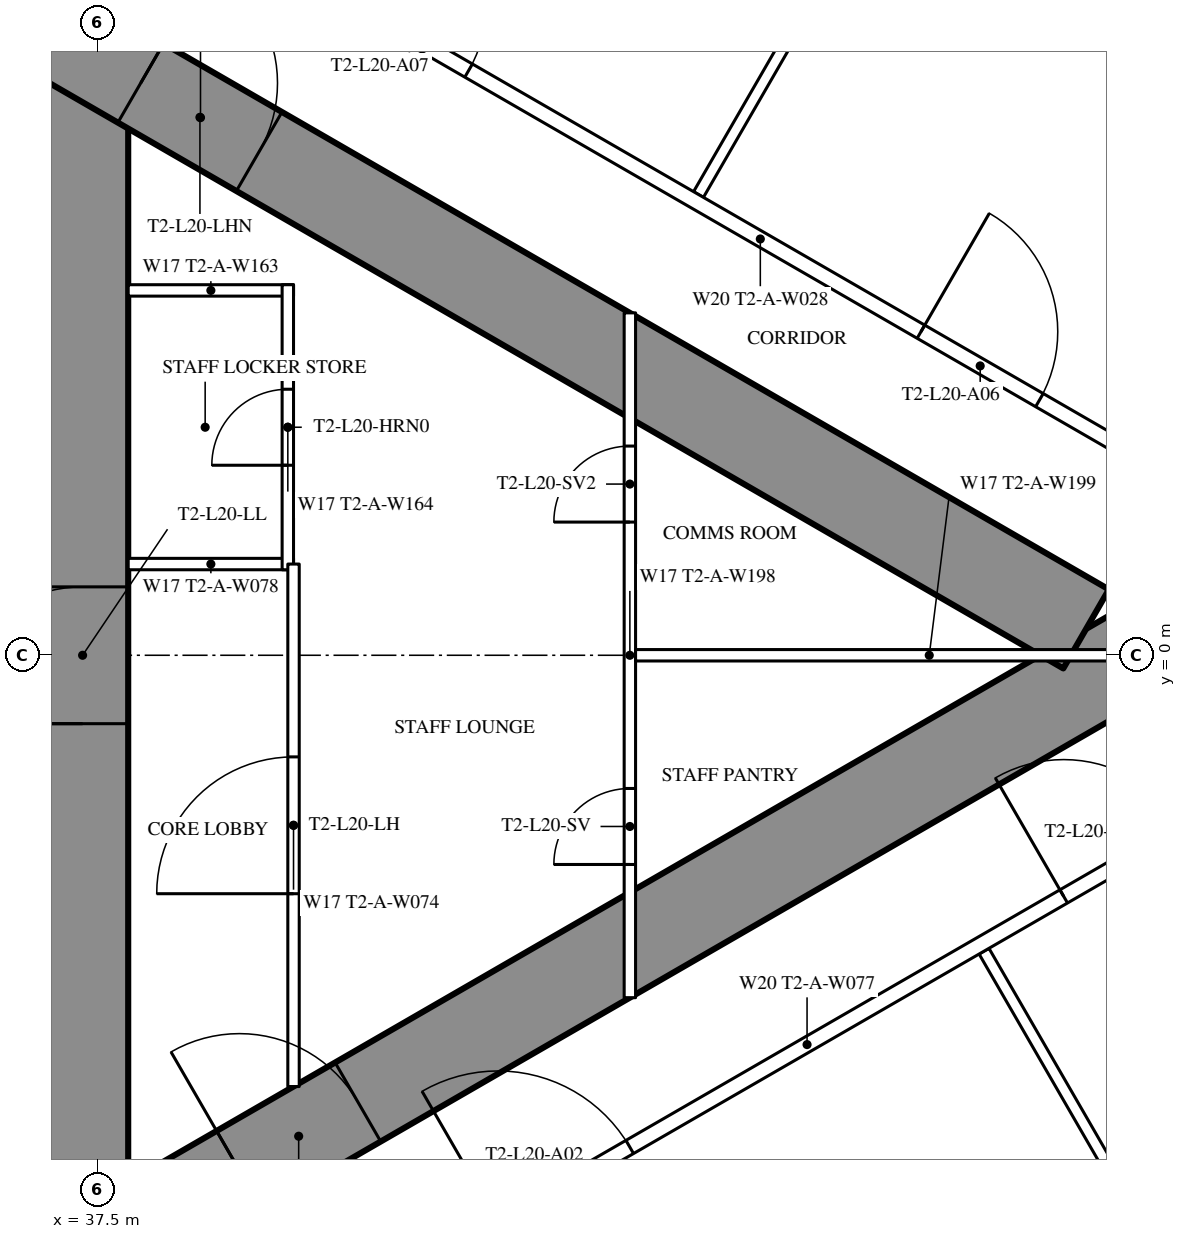
"""IFC4 building model, lengths in metres.
Left out: names, types, materials, properties, quantities, classifications, styles, units other than length and angle.
Written with IfcOpenShell. Run it as: python <this file> out.ifc"""

import sys

from ifc_helpers import new_model, si_unit, direction, frame, frame_2d, origin, place, context, subcontext, project, spatial, rectangle, extrude, element, fill, save


model = new_model("IFC4")
c1 = context("Model", 3, precision=1e-05, world=origin(), true_north=direction((0.0, 1.0)))
c2 = subcontext(c1, "Body", "Model", "MODEL_VIEW")
j1 = project(units=[si_unit("LENGTHUNIT", "METRE"), si_unit("PLANEANGLEUNIT", "RADIAN")], contexts=[c1])
p1 = place(None, origin())
s1 = spatial("IfcSite", under=j1, at=p1, CompositionType="ELEMENT")
p2 = place(p1, origin())
s2 = spatial("IfcBuilding", under=s1, at=p2, CompositionType="ELEMENT")
p3 = place(p2, frame((0.0, 0.0, 77.5)))
s3 = spatial("IfcBuildingStorey", under=s2, at=p3, CompositionType="ELEMENT", Elevation=77.5)
p4 = place(p3, frame((37.3, -8.6, 0.0), z_axis=(0.0, 0.0, 1.0), x_axis=(0.0, 1.0, 0.0)))
e1 = element("IfcWall", 1, at=p4, inside=s3, PredefinedType="SHEAR", context=c2, shape_type="SweptSolid", body=[
    extrude(rectangle(XDim=17.2, YDim=1.2, at=frame_2d((8.6, 0.0))), origin(), (0.0, 0.0, 1.0), 3.5),
])
p5 = place(p4, frame((7.7, 0.0, 0.0)))
e2 = element("IfcOpeningElement", 2, at=p5, cuts=e1, PredefinedType="OPENING", context=c2, shape_type="SweptSolid", body=[
    extrude(rectangle(XDim=1.8, YDim=2.2, at=frame_2d((0.9, 1.1))), frame((0.0, 0.61, 0.0), z_axis=(0.0, -1.0, 0.0), x_axis=(1.0, 0.0, 0.0)), (0.0, 0.0, 1.0), 1.22),
])
p6 = place(p3, frame((27.2, -13.8, 0.0), z_axis=(0.0, 0.0, 1.0), x_axis=(0.866027159892, 0.499996958321, 0.0)))
e3 = element("IfcWall", 3, at=p6, inside=s3, PredefinedType="SHEAR", context=c2, shape_type="SweptSolid", body=[
    extrude(rectangle(XDim=27.947, YDim=1.2, at=frame_2d((13.973, 0.0))), origin(), (0.0, 0.0, 1.0), 3.5),
])
p7 = place(p6, frame((5.65, 0.0, 0.0)))
e4 = element("IfcOpeningElement", 4, at=p7, cuts=e3, PredefinedType="OPENING", context=c2, shape_type="SweptSolid", body=[
    extrude(rectangle(XDim=1.0, YDim=2.2, at=frame_2d((0.5, 1.1))), frame((0.0, 0.61, 0.0), z_axis=(0.0, -1.0, 0.0), x_axis=(1.0, 0.0, 0.0)), (0.0, 0.0, 1.0), 1.22),
])
p8 = place(p6, frame((14.045, 0.0, 0.0)))
e5 = element("IfcOpeningElement", 5, at=p8, cuts=e3, PredefinedType="OPENING", context=c2, shape_type="SweptSolid", body=[
    extrude(rectangle(XDim=1.8, YDim=2.2, at=frame_2d((0.9, 1.1))), frame((0.0, 0.61, 0.0), z_axis=(0.0, -1.0, 0.0), x_axis=(1.0, 0.0, 0.0)), (0.0, 0.0, 1.0), 1.22),
])
p9 = place(p3, frame((27.2, 13.8, 0.0), z_axis=(0.0, 0.0, 1.0), x_axis=(0.866024515034, -0.500001539357, 0.0)))
e6 = element("IfcWall", 6, at=p9, inside=s3, PredefinedType="SHEAR", context=c2, shape_type="SweptSolid", body=[
    extrude(rectangle(XDim=26.907, YDim=1.2, at=frame_2d((13.454, 0.0))), origin(), (0.0, 0.0, 1.0), 3.5),
])
p10 = place(p9, frame((4.5, 0.0, 0.0)))
e7 = element("IfcOpeningElement", 7, at=p10, cuts=e6, PredefinedType="OPENING", context=c2, shape_type="SweptSolid", body=[
    extrude(rectangle(XDim=1.0, YDim=2.2, at=frame_2d((0.5, 1.1))), frame((0.0, 0.61, 0.0), z_axis=(0.0, -1.0, 0.0), x_axis=(1.0, 0.0, 0.0)), (0.0, 0.0, 1.0), 1.22),
])
p11 = place(p9, frame((12.545, 0.0, 0.0)))
e8 = element("IfcOpeningElement", 8, at=p11, cuts=e6, PredefinedType="OPENING", context=c2, shape_type="SweptSolid", body=[
    extrude(rectangle(XDim=1.8, YDim=2.2, at=frame_2d((0.9, 1.1))), frame((0.0, 0.61, 0.0), z_axis=(0.0, -1.0, 0.0), x_axis=(1.0, 0.0, 0.0)), (0.0, 0.0, 1.0), 1.22),
])
p12 = place(p3, frame((49.159, -3.893, 0.0), z_axis=(0.0, 0.0, 1.0), x_axis=(0.499998773722, -0.866026111775, 0.0)))
e9 = element("IfcWall", 9, at=p12, inside=s3, PredefinedType="PARTITIONING", context=c2, shape_type="SweptSolid", body=[
    extrude(rectangle(XDim=9.892, YDim=0.15, at=frame_2d((4.946, 0.0))), origin(), (0.0, 0.0, 1.0), 2.05),
])
p13 = place(p3, frame((45.403, 6.062, 0.0), z_axis=(0.0, 0.0, 1.0), x_axis=(0.500013434677, 0.866017647131, 0.0)))
e10 = element("IfcWall", 10, at=p13, inside=s3, PredefinedType="PARTITIONING", context=c2, shape_type="SweptSolid", body=[
    extrude(rectangle(XDim=9.902, YDim=0.15, at=frame_2d((4.951, 0.0))), origin(), (0.0, 0.0, 1.0), 2.05),
])
p14 = place(p3, frame((37.96, -10.243, 0.0), z_axis=(0.0, 0.0, 1.0), x_axis=(0.866026429433, 0.499998223521, 0.0)))
e11 = element("IfcWall", 11, at=p14, inside=s3, PredefinedType="PARTITIONING", context=c2, shape_type="SweptSolid", body=[
    extrude(rectangle(XDim=20.487, YDim=0.2, at=frame_2d((10.243, 0.0))), origin(), (0.0, 0.0, 1.0), 3.25),
])
p15 = place(p14, frame((14.142, 0.0, 0.0)))
e12 = element("IfcOpeningElement", 12, at=p15, cuts=e11, PredefinedType="OPENING", context=c2, shape_type="SweptSolid", body=[
    extrude(rectangle(XDim=1.8, YDim=2.2, at=frame_2d((0.9, 1.1))), frame((0.0, 0.11, 0.0), z_axis=(0.0, -1.0, 0.0), x_axis=(1.0, 0.0, 0.0)), (0.0, 0.0, 1.0), 0.22),
])
p16 = place(p14, frame((17.836, 0.0, 0.0)))
e13 = element("IfcOpeningElement", 13, at=p16, cuts=e11, PredefinedType="OPENING", context=c2, shape_type="SweptSolid", body=[
    extrude(rectangle(XDim=1.8, YDim=2.04, at=frame_2d((0.9, 1.02))), frame((0.0, 0.11, 0.0), z_axis=(0.0, -1.0, 0.0), x_axis=(1.0, 0.0, 0.0)), (0.0, 0.0, 1.0), 0.22),
])
p17 = place(p14, frame((5.55, 0.0, 0.0)))
e14 = element("IfcOpeningElement", 14, at=p17, cuts=e11, PredefinedType="OPENING", context=c2, shape_type="SweptSolid", body=[
    extrude(rectangle(XDim=2.0, YDim=2.4, at=frame_2d((1.0, 1.2))), frame((0.0, 0.11, 0.0), z_axis=(0.0, -1.0, 0.0), x_axis=(1.0, 0.0, 0.0)), (0.0, 0.0, 1.0), 0.22),
])
p18 = place(p3, frame((36.834, 10.894, 0.0), z_axis=(0.0, 0.0, 1.0), x_axis=(0.866028157229, -0.499995230863, 0.0)))
e15 = element("IfcWall", 15, at=p18, inside=s3, PredefinedType="PARTITIONING", context=c2, shape_type="SweptSolid", body=[
    extrude(rectangle(XDim=21.667, YDim=0.2, at=frame_2d((10.833, 0.0))), origin(), (0.0, 0.0, 1.0), 3.25),
])
p19 = place(p18, frame((19.076, 0.0, 0.0)))
e16 = element("IfcOpeningElement", 16, at=p19, cuts=e15, PredefinedType="OPENING", context=c2, shape_type="SweptSolid", body=[
    extrude(rectangle(XDim=1.8, YDim=2.04, at=frame_2d((0.9, 1.02))), frame((0.0, 0.11, 0.0), z_axis=(0.0, -1.0, 0.0), x_axis=(1.0, 0.0, 0.0)), (0.0, 0.0, 1.0), 0.22),
])
p20 = place(p18, frame((13.274, 0.0, 0.0)))
e17 = element("IfcOpeningElement", 17, at=p20, cuts=e15, PredefinedType="OPENING", context=c2, shape_type="SweptSolid", body=[
    extrude(rectangle(XDim=1.8, YDim=2.2, at=frame_2d((0.9, 1.1))), frame((0.0, 0.11, 0.0), z_axis=(0.0, -1.0, 0.0), x_axis=(1.0, 0.0, 0.0)), (0.0, 0.0, 1.0), 0.22),
])
p21 = place(p18, frame((4.602, 0.0, 0.0)))
e18 = element("IfcOpeningElement", 18, at=p21, cuts=e15, PredefinedType="OPENING", context=c2, shape_type="SweptSolid", body=[
    extrude(rectangle(XDim=1.8, YDim=2.2, at=frame_2d((0.9, 1.1))), frame((0.0, 0.11, 0.0), z_axis=(0.0, -1.0, 0.0), x_axis=(1.0, 0.0, 0.0)), (0.0, 0.0, 1.0), 0.22),
])
for number, where, z_axis, x_axis in (
    (19, (37.9, 1.2, 0.0), (0.0, 0.0, 1.0), (1.0, 0.0, 0.0)),
    (20, (37.9, 4.8, 0.0), (0.0, 0.0, 1.0), (1.0, 0.0, 0.0)),
):
    element("IfcWall", number, at=place(p3, frame(where, z_axis=z_axis, x_axis=x_axis)), inside=s3, PredefinedType="PARTITIONING", context=c2, shape_type="SweptSolid", body=[
        extrude(rectangle(XDim=2.175, YDim=0.15, at=frame_2d((1.087, 0.0))), origin(), (0.0, 0.0, 1.0), 3.25),
    ])
p22 = place(p3, frame((40.0, 1.125, 0.0), z_axis=(0.0, 0.0, 1.0), x_axis=(0.0, 1.0, 0.0)))
e21 = element("IfcWall", 21, at=p22, inside=s3, PredefinedType="PARTITIONING", context=c2, shape_type="SweptSolid", body=[
    extrude(rectangle(XDim=3.75, YDim=0.15, at=frame_2d((1.875, 0.0))), origin(), (0.0, 0.0, 1.0), 3.25),
])
p23 = place(p22, frame((1.375, 0.0, 0.0)))
e22 = element("IfcOpeningElement", 22, at=p23, cuts=e21, PredefinedType="OPENING", context=c2, shape_type="SweptSolid", body=[
    extrude(rectangle(XDim=1.0, YDim=2.2, at=frame_2d((0.5, 1.1))), frame((0.0, 0.085, 0.0), z_axis=(0.0, -1.0, 0.0), x_axis=(1.0, 0.0, 0.0)), (0.0, 0.0, 1.0), 0.17),
])
p24 = place(p3, frame((40.075, -5.674, 0.0), z_axis=(0.0, 0.0, 1.0), x_axis=(0.0, 1.0, 0.0)))
e23 = element("IfcWall", 23, at=p24, inside=s3, PredefinedType="PARTITIONING", context=c2, shape_type="SweptSolid", body=[
    extrude(rectangle(XDim=6.874, YDim=0.15, at=frame_2d((3.437, 0.0))), origin(), (0.0, 0.0, 1.0), 3.25),
])
p25 = place(p24, frame((2.537, 0.0, 0.0)))
e24 = element("IfcOpeningElement", 24, at=p25, cuts=e23, PredefinedType="OPENING", context=c2, shape_type="SweptSolid", body=[
    extrude(rectangle(XDim=1.8, YDim=2.2, at=frame_2d((0.9, 1.1))), frame((0.0, 0.085, 0.0), z_axis=(0.0, -1.0, 0.0), x_axis=(1.0, 0.0, 0.0)), (0.0, 0.0, 1.0), 0.17),
])
p26 = place(p3, frame((44.5, -4.505, 0.0), z_axis=(0.0, 0.0, 1.0), x_axis=(0.0, 1.0, 0.0)))
e25 = element("IfcWall", 25, at=p26, inside=s3, PredefinedType="PARTITIONING", context=c2, shape_type="SweptSolid", body=[
    extrude(rectangle(XDim=9.009, YDim=0.15, at=frame_2d((4.505, 0.0))), origin(), (0.0, 0.0, 1.0), 3.25),
])
p27 = place(p26, frame((1.752, 0.0, 0.0)))
e26 = element("IfcOpeningElement", 26, at=p27, cuts=e25, PredefinedType="OPENING", context=c2, shape_type="SweptSolid", body=[
    extrude(rectangle(XDim=1.0, YDim=2.2, at=frame_2d((0.5, 1.1))), frame((0.0, 0.085, 0.0), z_axis=(0.0, -1.0, 0.0), x_axis=(1.0, 0.0, 0.0)), (0.0, 0.0, 1.0), 0.17),
])
p28 = place(p26, frame((6.257, 0.0, 0.0)))
e27 = element("IfcOpeningElement", 27, at=p28, cuts=e25, PredefinedType="OPENING", context=c2, shape_type="SweptSolid", body=[
    extrude(rectangle(XDim=1.0, YDim=2.2, at=frame_2d((0.5, 1.1))), frame((0.0, 0.085, 0.0), z_axis=(0.0, -1.0, 0.0), x_axis=(1.0, 0.0, 0.0)), (0.0, 0.0, 1.0), 0.17),
])
p29 = place(p3, frame((44.575, 0.0, 0.0), z_axis=(0.0, 0.0, 1.0), x_axis=(1.0, 0.0, 0.0)))
e28 = element("IfcWall", 28, at=p29, inside=s3, PredefinedType="PARTITIONING", context=c2, shape_type="SweptSolid", body=[
    extrude(rectangle(XDim=7.727, YDim=0.15, at=frame_2d((3.864, 0.0))), origin(), (0.0, 0.0, 1.0), 2.05),
])
p30 = place(p15, origin())
e29 = element("IfcDoor", 29, at=p30, inside=s3, OperationType="DOUBLE_DOOR_SINGLE_SWING", PredefinedType="DOOR", context=c2, shape_type="SweptSolid", body=[
    extrude(rectangle(XDim=1.8, YDim=2.2, at=frame_2d((0.9, 1.1))), frame((0.0, 0.025, 0.0), z_axis=(0.0, -1.0, 0.0), x_axis=(1.0, 0.0, 0.0)), (0.0, 0.0, 1.0), 0.05),
])
fill(e12, e29)
p31 = place(p20, origin())
e30 = element("IfcDoor", 30, at=p31, inside=s3, OperationType="DOUBLE_DOOR_SINGLE_SWING", PredefinedType="DOOR", context=c2, shape_type="SweptSolid", body=[
    extrude(rectangle(XDim=1.8, YDim=2.2, at=frame_2d((0.9, 1.1))), frame((0.0, 0.025, 0.0), z_axis=(0.0, -1.0, 0.0), x_axis=(1.0, 0.0, 0.0)), (0.0, 0.0, 1.0), 0.05),
])
fill(e17, e30)
p32 = place(p21, origin())
e31 = element("IfcDoor", 31, at=p32, inside=s3, OperationType="DOUBLE_DOOR_SINGLE_SWING", PredefinedType="DOOR", context=c2, shape_type="SweptSolid", body=[
    extrude(rectangle(XDim=1.8, YDim=2.2, at=frame_2d((0.9, 1.1))), frame((0.0, 0.025, 0.0), z_axis=(0.0, -1.0, 0.0), x_axis=(1.0, 0.0, 0.0)), (0.0, 0.0, 1.0), 0.05),
])
fill(e18, e31)
p33 = place(p17, origin())
e32 = element("IfcDoor", 32, at=p33, inside=s3, OperationType="DOUBLE_DOOR_SINGLE_SWING", PredefinedType="DOOR", context=c2, shape_type="SweptSolid", body=[
    extrude(rectangle(XDim=2.0, YDim=2.4, at=frame_2d((1.0, 1.2))), frame((0.0, 0.025, 0.0), z_axis=(0.0, -1.0, 0.0), x_axis=(1.0, 0.0, 0.0)), (0.0, 0.0, 1.0), 0.05),
])
fill(e14, e32)
p34 = place(p23, origin())
e33 = element("IfcDoor", 33, at=p34, inside=s3, OperationType="SINGLE_SWING_LEFT", PredefinedType="DOOR", context=c2, shape_type="SweptSolid", body=[
    extrude(rectangle(XDim=1.0, YDim=2.2, at=frame_2d((0.5, 1.1))), frame((0.0, 0.025, 0.0), z_axis=(0.0, -1.0, 0.0), x_axis=(1.0, 0.0, 0.0)), (0.0, 0.0, 1.0), 0.05),
])
fill(e22, e33)
p35 = place(p25, origin())
e34 = element("IfcDoor", 34, at=p35, inside=s3, OperationType="DOUBLE_DOOR_SINGLE_SWING", PredefinedType="DOOR", context=c2, shape_type="SweptSolid", body=[
    extrude(rectangle(XDim=1.8, YDim=2.2, at=frame_2d((0.9, 1.1))), frame((0.0, 0.025, 0.0), z_axis=(0.0, -1.0, 0.0), x_axis=(1.0, 0.0, 0.0)), (0.0, 0.0, 1.0), 0.05),
])
fill(e24, e34)
p36 = place(p27, origin())
e35 = element("IfcDoor", 35, at=p36, inside=s3, OperationType="SINGLE_SWING_LEFT", PredefinedType="DOOR", context=c2, shape_type="SweptSolid", body=[
    extrude(rectangle(XDim=1.0, YDim=2.2, at=frame_2d((0.5, 1.1))), frame((0.0, 0.025, 0.0), z_axis=(0.0, -1.0, 0.0), x_axis=(1.0, 0.0, 0.0)), (0.0, 0.0, 1.0), 0.05),
])
fill(e26, e35)
p37 = place(p28, origin())
e36 = element("IfcDoor", 36, at=p37, inside=s3, OperationType="SINGLE_SWING_LEFT", PredefinedType="DOOR", context=c2, shape_type="SweptSolid", body=[
    extrude(rectangle(XDim=1.0, YDim=2.2, at=frame_2d((0.5, 1.1))), frame((0.0, 0.025, 0.0), z_axis=(0.0, -1.0, 0.0), x_axis=(1.0, 0.0, 0.0)), (0.0, 0.0, 1.0), 0.05),
])
fill(e27, e36)
p38 = place(p8, origin())
e37 = element("IfcDoor", 37, at=p38, inside=s3, OperationType="DOUBLE_DOOR_SINGLE_SWING", PredefinedType="DOOR", context=c2, shape_type="SweptSolid", body=[
    extrude(rectangle(XDim=1.8, YDim=2.2, at=frame_2d((0.9, 1.1))), frame((0.0, 0.025, 0.0), z_axis=(0.0, -1.0, 0.0), x_axis=(1.0, 0.0, 0.0)), (0.0, 0.0, 1.0), 0.05),
])
fill(e5, e37)
p39 = place(p11, origin())
e38 = element("IfcDoor", 38, at=p39, inside=s3, OperationType="DOUBLE_DOOR_SINGLE_SWING", PredefinedType="DOOR", context=c2, shape_type="SweptSolid", body=[
    extrude(rectangle(XDim=1.8, YDim=2.2, at=frame_2d((0.9, 1.1))), frame((0.0, 0.025, 0.0), z_axis=(0.0, -1.0, 0.0), x_axis=(1.0, 0.0, 0.0)), (0.0, 0.0, 1.0), 0.05),
])
fill(e8, e38)
p40 = place(p5, origin())
e39 = element("IfcDoor", 39, at=p40, inside=s3, OperationType="DOUBLE_DOOR_SINGLE_SWING", PredefinedType="DOOR", context=c2, shape_type="SweptSolid", body=[
    extrude(rectangle(XDim=1.8, YDim=2.2, at=frame_2d((0.9, 1.1))), frame((0.0, 0.025, 0.0), z_axis=(0.0, -1.0, 0.0), x_axis=(1.0, 0.0, 0.0)), (0.0, 0.0, 1.0), 0.05),
])
fill(e2, e39)
save(model, sys.argv[1])
